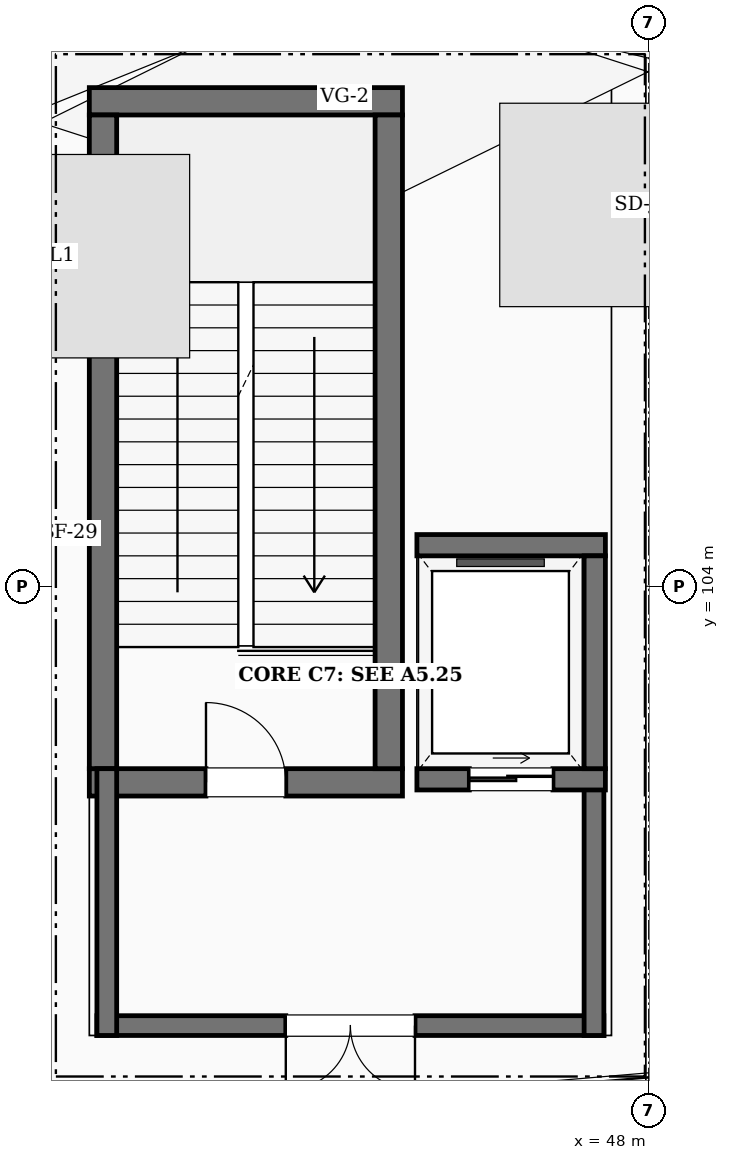
"""IFC4 building model, lengths in metres.
Left out: names, types, materials, properties, quantities, classifications, styles, units other than length and angle.
Written with IfcOpenShell. Run it as: python <this file> out.ifc"""

import sys

from ifc_helpers import new_model, si_unit, direction, frame, frame_2d, origin, place, context, subcontext, project, spatial, rectangle, extrude, element, fill, save


model = new_model("IFC4")
c1 = context("Model", 3, precision=1e-05, world=origin(), true_north=direction((0.0, 1.0)))
c2 = subcontext(c1, "Body", "Model", "MODEL_VIEW")
j1 = project(units=[si_unit("LENGTHUNIT", "METRE"), si_unit("PLANEANGLEUNIT", "RADIAN")], contexts=[c1])
p1 = place(None, origin())
s1 = spatial("IfcSite", under=j1, at=p1, CompositionType="ELEMENT")
p2 = place(p1, origin())
s2 = spatial("IfcBuilding", under=s1, at=p2, CompositionType="ELEMENT")
p3 = place(p2, frame((0.0, 0.0, 10.8)))
s3 = spatial("IfcBuildingStorey", under=s2, at=p3, CompositionType="ELEMENT", Elevation=10.8)
p4 = place(p3, frame((40.64, 101.42, 0.0), z_axis=(0.0, 0.0, 1.0), x_axis=(1.0, 0.0, 0.0)))
e1 = element("IfcWall", 1, at=p4, inside=s3, PredefinedType="SHEAR", context=c2, shape_type="SweptSolid", body=[
    extrude(rectangle(XDim=4.12, YDim=0.36, at=frame_2d((2.06, 0.0))), origin(), (0.0, 0.0, 1.0), 2.65),
])
p5 = place(p4, frame((1.535, 0.0, 0.0)))
e2 = element("IfcOpeningElement", 2, at=p5, cuts=e1, PredefinedType="OPENING", context=c2, shape_type="SweptSolid", body=[
    extrude(rectangle(XDim=1.05, YDim=2.15, at=frame_2d((0.525, 1.075))), frame((0.0, 0.19, 0.0), z_axis=(0.0, -1.0, 0.0), x_axis=(1.0, 0.0, 0.0)), (0.0, 0.0, 1.0), 0.38),
])
p6 = place(p3, frame((40.64, 110.38, 0.0), z_axis=(0.0, 0.0, 1.0), x_axis=(1.0, 0.0, 0.0)))
e3 = element("IfcWall", 3, at=p6, inside=s3, PredefinedType="SHEAR", context=c2, shape_type="SweptSolid", body=[
    extrude(rectangle(XDim=4.12, YDim=0.36, at=frame_2d((2.06, 0.0))), origin(), (0.0, 0.0, 1.0), 2.65),
])
for number, where, z_axis, x_axis in (
    (4, (40.82, 101.6, 0.0), (0.0, 0.0, 1.0), (0.0, 1.0, 0.0)),
    (5, (44.58, 101.6, 0.0), (0.0, 0.0, 1.0), (0.0, 1.0, 0.0)),
):
    element("IfcWall", number, at=place(p3, frame(where, z_axis=z_axis, x_axis=x_axis)), inside=s3, PredefinedType="SHEAR", context=c2, shape_type="SweptSolid", body=[
        extrude(rectangle(XDim=8.6, YDim=0.36, at=frame_2d((4.3, 0.0))), origin(), (0.0, 0.0, 1.0), 2.65),
    ])
p7 = place(p3, frame((47.41, 98.22, 0.0), z_axis=(0.0, 0.0, 1.0), x_axis=(-1.0, 0.0, 0.0)))
e6 = element("IfcWall", 6, at=p7, inside=s3, PredefinedType="SHEAR", context=c2, shape_type="SweptSolid", body=[
    extrude(rectangle(XDim=6.67, YDim=0.26, at=frame_2d((3.335, 0.0))), origin(), (0.0, 0.0, 1.0), 2.65),
])
p8 = place(p7, frame((2.485, 0.0, 0.0)))
e7 = element("IfcOpeningElement", 7, at=p8, cuts=e6, PredefinedType="OPENING", context=c2, shape_type="SweptSolid", body=[
    extrude(rectangle(XDim=1.7, YDim=2.2, at=frame_2d((0.85, 1.1))), frame((0.0, 0.14, 0.0), z_axis=(0.0, -1.0, 0.0), x_axis=(1.0, 0.0, 0.0)), (0.0, 0.0, 1.0), 0.28),
])
for number, where, z_axis, x_axis in (
    (8, (40.87, 98.09, 0.0), (0.0, 0.0, 1.0), (0.0, 1.0, 0.0)),
    (9, (47.28, 98.09, 0.0), (0.0, 0.0, 1.0), (0.0, 1.0, 0.0)),
):
    element("IfcWall", number, at=place(p3, frame(where, z_axis=z_axis, x_axis=x_axis)), inside=s3, PredefinedType="SHEAR", context=c2, shape_type="SweptSolid", body=[
        extrude(rectangle(XDim=3.51, YDim=0.26, at=frame_2d((1.755, 0.0))), origin(), (0.0, 0.0, 1.0), 2.65),
    ])
p9 = place(p3, frame((44.95, 101.46, 0.0), z_axis=(0.0, 0.0, 1.0), x_axis=(1.0, 0.0, 0.0)))
e10 = element("IfcWall", 10, at=p9, inside=s3, PredefinedType="SHEAR", context=c2, shape_type="SweptSolid", body=[
    extrude(rectangle(XDim=2.48, YDim=0.28, at=frame_2d((1.24, 0.0))), origin(), (0.0, 0.0, 1.0), 2.65),
])
p10 = place(p9, frame((0.69, 0.0, 0.0)))
e11 = element("IfcOpeningElement", 11, at=p10, cuts=e10, PredefinedType="OPENING", context=c2, shape_type="SweptSolid", body=[
    extrude(rectangle(XDim=1.1, YDim=2.15, at=frame_2d((0.55, 1.075))), frame((0.0, 0.15, 0.0), z_axis=(0.0, -1.0, 0.0), x_axis=(1.0, 0.0, 0.0)), (0.0, 0.0, 1.0), 0.3),
])
p11 = place(p3, frame((44.95, 104.54, 0.0), z_axis=(0.0, 0.0, 1.0), x_axis=(1.0, 0.0, 0.0)))
e12 = element("IfcWall", 12, at=p11, inside=s3, PredefinedType="SHEAR", context=c2, shape_type="SweptSolid", body=[
    extrude(rectangle(XDim=2.48, YDim=0.28, at=frame_2d((1.24, 0.0))), origin(), (0.0, 0.0, 1.0), 2.65),
])
p12 = place(p3, frame((47.29, 101.6, 0.0), z_axis=(0.0, 0.0, 1.0), x_axis=(0.0, 1.0, 0.0)))
e13 = element("IfcWall", 13, at=p12, inside=s3, PredefinedType="SHEAR", context=c2, shape_type="SweptSolid", body=[
    extrude(rectangle(XDim=2.8, YDim=0.28, at=frame_2d((1.4, 0.0))), origin(), (0.0, 0.0, 1.0), 2.65),
])
p13 = place(p5, origin())
e14 = element("IfcDoor", 14, at=p13, inside=s3, OperationType="SINGLE_SWING_LEFT", PredefinedType="DOOR", context=c2, shape_type="SweptSolid", body=[
    extrude(rectangle(XDim=1.05, YDim=2.15, at=frame_2d((0.525, 1.075))), frame((0.0, 0.025, 0.0), z_axis=(0.0, -1.0, 0.0), x_axis=(1.0, 0.0, 0.0)), (0.0, 0.0, 1.0), 0.05),
])
fill(e2, e14)
p14 = place(p8, origin())
e15 = element("IfcDoor", 15, at=p14, inside=s3, OperationType="DOUBLE_DOOR_SINGLE_SWING", PredefinedType="DOOR", context=c2, shape_type="SweptSolid", body=[
    extrude(rectangle(XDim=1.7, YDim=2.2, at=frame_2d((0.85, 1.1))), frame((0.0, 0.025, 0.0), z_axis=(0.0, -1.0, 0.0), x_axis=(1.0, 0.0, 0.0)), (0.0, 0.0, 1.0), 0.05),
])
fill(e7, e15)
p15 = place(p10, origin())
e16 = element("IfcDoor", 16, at=p15, inside=s3, OperationType="SLIDING_TO_LEFT", PredefinedType="DOOR", context=c2, shape_type="SweptSolid", body=[
    extrude(rectangle(XDim=1.1, YDim=2.15, at=frame_2d((0.55, 1.075))), frame((0.0, 0.025, 0.0), z_axis=(0.0, -1.0, 0.0), x_axis=(1.0, 0.0, 0.0)), (0.0, 0.0, 1.0), 0.05),
])
fill(e11, e16)
save(model, sys.argv[1])
